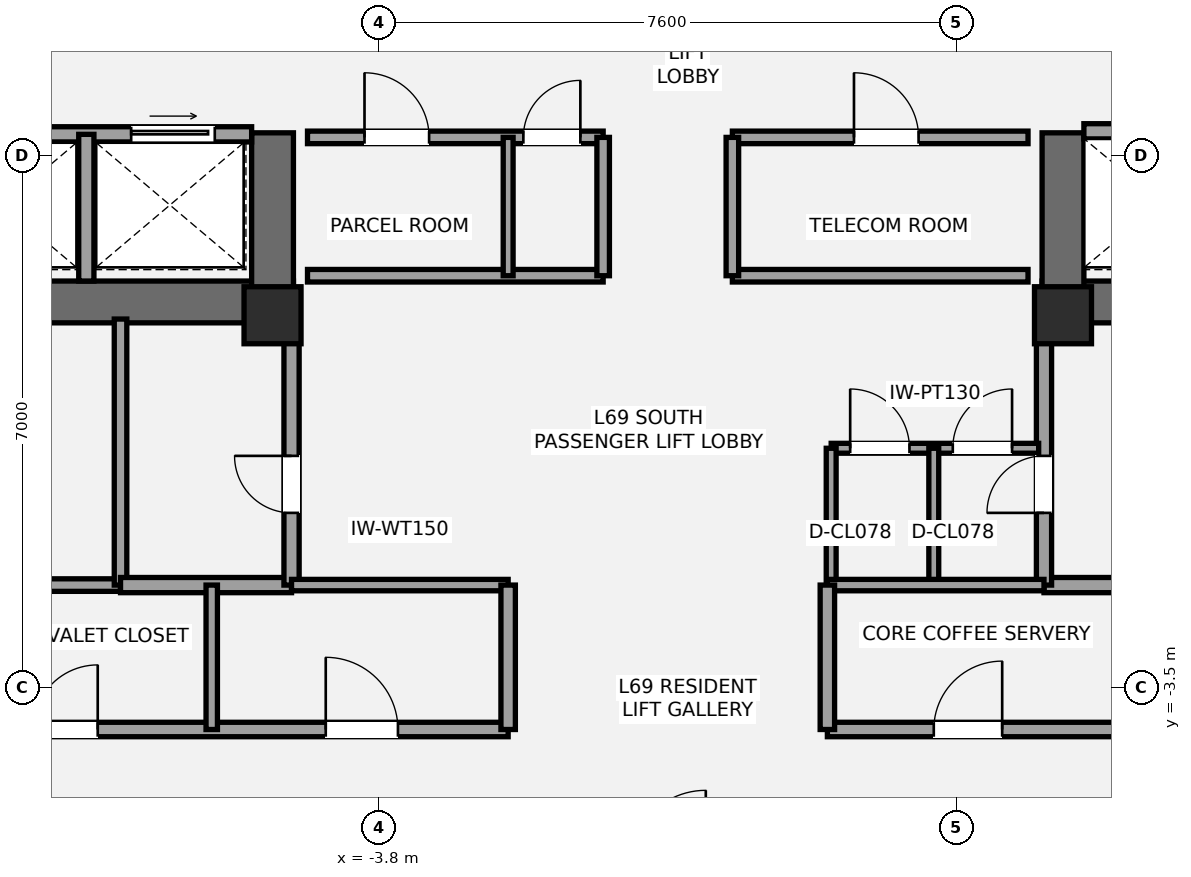
"""IFC4 building model, lengths in metres.
Left out: names, types, materials, properties, quantities, classifications, styles, units other than length and angle.
Written with IfcOpenShell. Run it as: python <this file> out.ifc"""

import sys

from ifc_helpers import new_model, si_unit, direction, frame, frame_2d, origin, origin_2d, place, context, subcontext, project, spatial, rectangle, extrude, element, fill, save


model = new_model("IFC4")
c1 = context("Model", 3, precision=1e-05, world=origin(), true_north=direction((0.0, 1.0)))
c2 = subcontext(c1, "Body", "Model", "MODEL_VIEW")
j1 = project(units=[si_unit("LENGTHUNIT", "METRE"), si_unit("PLANEANGLEUNIT", "RADIAN")], contexts=[c1])
p1 = place(None, origin())
s1 = spatial("IfcSite", under=j1, at=p1, CompositionType="ELEMENT")
p2 = place(p1, origin())
s2 = spatial("IfcBuilding", under=s1, at=p2, CompositionType="ELEMENT")
p3 = place(p2, frame((0.0, 0.0, 244.65)))
s3 = spatial("IfcBuildingStorey", under=s2, at=p3, CompositionType="ELEMENT", Elevation=244.65)
p4 = place(p3, frame((-4.925, 1.575, 0.0), z_axis=(0.0, 0.0, 1.0), x_axis=(-1.0, 0.0, 0.0)))
e1 = element("IfcWall", 1, at=p4, inside=s3, PredefinedType="SHEAR", context=c2, shape_type="SweptSolid", body=[
    extrude(rectangle(XDim=8.775, YDim=0.55, at=frame_2d((4.387, 0.0))), origin(), (0.0, 0.0, 1.0), 3.15),
])
p5 = place(p4, frame((5.375, 0.0, 0.0)))
e2 = element("IfcOpeningElement", 2, at=p5, cuts=e1, PredefinedType="OPENING", context=c2, shape_type="SweptSolid", body=[
    extrude(rectangle(XDim=1.05, YDim=2.15, at=frame_2d((0.525, 1.075))), frame((0.0, 0.285, 0.0), z_axis=(0.0, -1.0, 0.0), x_axis=(1.0, 0.0, 0.0)), (0.0, 0.0, 1.0), 0.57),
])
p6 = place(p4, frame((3.705, 0.0, 0.0)))
e3 = element("IfcOpeningElement", 3, at=p6, cuts=e1, PredefinedType="OPENING", context=c2, shape_type="SweptSolid", body=[
    extrude(rectangle(XDim=1.1, YDim=2.2, at=frame_2d((0.55, 1.1))), frame((0.0, 0.285, 0.0), z_axis=(0.0, -1.0, 0.0), x_axis=(1.0, 0.0, 0.0)), (0.0, 0.0, 1.0), 0.57),
])
p7 = place(p3, frame((-5.2, 1.3, 0.0), z_axis=(0.0, 0.0, 1.0), x_axis=(0.0, 1.0, 0.0)))
e4 = element("IfcWall", 4, at=p7, inside=s3, PredefinedType="SHEAR", context=c2, shape_type="SweptSolid", body=[
    extrude(rectangle(XDim=2.5, YDim=0.55, at=frame_2d((1.25, 0.0))), origin(), (0.0, 0.0, 1.0), 3.15),
])
p8 = place(p3, frame((13.7, 1.575, 0.0), z_axis=(0.0, 0.0, 1.0), x_axis=(-1.0, 0.0, 0.0)))
e5 = element("IfcWall", 5, at=p8, inside=s3, PredefinedType="SHEAR", context=c2, shape_type="SweptSolid", body=[
    extrude(rectangle(XDim=8.775, YDim=0.55, at=frame_2d((4.387, 0.0))), origin(), (0.0, 0.0, 1.0), 3.15),
])
p9 = place(p8, frame((2.35, 0.0, 0.0)))
e6 = element("IfcOpeningElement", 6, at=p9, cuts=e5, PredefinedType="OPENING", context=c2, shape_type="SweptSolid", body=[
    extrude(rectangle(XDim=1.05, YDim=2.15, at=frame_2d((0.525, 1.075))), frame((0.0, 0.285, 0.0), z_axis=(0.0, -1.0, 0.0), x_axis=(1.0, 0.0, 0.0)), (0.0, 0.0, 1.0), 0.57),
])
p10 = place(p8, frame((4.35, 0.0, 0.0)))
e7 = element("IfcOpeningElement", 7, at=p10, cuts=e5, PredefinedType="OPENING", context=c2, shape_type="SweptSolid", body=[
    extrude(rectangle(XDim=1.1, YDim=2.2, at=frame_2d((0.55, 1.1))), frame((0.0, 0.285, 0.0), z_axis=(0.0, -1.0, 0.0), x_axis=(1.0, 0.0, 0.0)), (0.0, 0.0, 1.0), 0.57),
])
p11 = place(p3, frame((5.2, 1.3, 0.0), z_axis=(0.0, 0.0, 1.0), x_axis=(0.0, 1.0, 0.0)))
e8 = element("IfcWall", 8, at=p11, inside=s3, PredefinedType="SHEAR", context=c2, shape_type="SweptSolid", body=[
    extrude(rectangle(XDim=2.5, YDim=0.55, at=frame_2d((1.25, 0.0))), origin(), (0.0, 0.0, 1.0), 3.15),
])
for number, where, z_axis, x_axis in (
    (9, (-5.2, 1.4, 0.0), (0.0, 0.0, 1.0), (1.0, 0.0, 0.0)),
    (10, (5.2, 1.4, 0.0), (0.0, 0.0, 1.0), (1.0, 0.0, 0.0)),
):
    element("IfcColumn", number, at=place(p3, frame(where, z_axis=z_axis, x_axis=x_axis)), inside=s3, PredefinedType="PILASTER", context=c2, shape_type="SweptSolid", body=[
        extrude(rectangle(XDim=0.75, YDim=0.75, at=origin_2d()), origin(), (0.0, 0.0, 1.0), 3.15),
    ])
p12 = place(p3, frame((-13.45, -2.15, 0.0), z_axis=(0.0, 0.0, 1.0), x_axis=(1.0, 0.0, 0.0)))
e11 = element("IfcWall", 11, at=p12, inside=s3, PredefinedType="PARTITIONING", context=c2, shape_type="SweptSolid", body=[
    extrude(rectangle(XDim=6.25, YDim=0.165, at=frame_2d((3.125, 0.0))), origin(), (0.0, 0.0, 1.0), 2.423),
])
p13 = place(p3, frame((-7.2, -2.15, 0.0), z_axis=(0.0, 0.0, 1.0), x_axis=(0.0, 1.0, 0.0)))
e12 = element("IfcWall", 12, at=p13, inside=s3, PredefinedType="PARTITIONING", context=c2, shape_type="SweptSolid", body=[
    extrude(rectangle(XDim=3.5, YDim=0.165, at=frame_2d((1.75, 0.0))), origin(), (0.0, 0.0, 1.0), 2.423),
])
p14 = place(p3, frame((-7.2, -2.15, 0.0), z_axis=(0.0, 0.0, 1.0), x_axis=(1.0, 0.0, 0.0)))
e13 = element("IfcWall", 13, at=p14, inside=s3, PredefinedType="SOLIDWALL", context=c2, shape_type="SweptSolid", body=[
    extrude(rectangle(XDim=2.25, YDim=0.2, at=frame_2d((1.125, 0.0))), origin(), (0.0, 0.0, 1.0), 2.97),
])
p15 = place(p3, frame((-4.95, -2.15, 0.0), z_axis=(0.0, 0.0, 1.0), x_axis=(0.0, 1.0, 0.0)))
e14 = element("IfcWall", 14, at=p15, inside=s3, PredefinedType="SOLIDWALL", context=c2, shape_type="SweptSolid", body=[
    extrude(rectangle(XDim=3.5, YDim=0.2, at=frame_2d((1.75, 0.0))), origin(), (0.0, 0.0, 1.0), 2.423),
])
p16 = place(p15, frame((0.95, 0.0, 0.0)))
e15 = element("IfcOpeningElement", 15, at=p16, cuts=e14, PredefinedType="OPENING", context=c2, shape_type="SweptSolid", body=[
    extrude(rectangle(XDim=0.75, YDim=2.1, at=frame_2d((0.375, 1.05))), frame((0.0, 0.11, 0.0), z_axis=(0.0, -1.0, 0.0), x_axis=(1.0, 0.0, 0.0)), (0.0, 0.0, 1.0), 0.22),
])
p17 = place(p3, frame((4.95, -2.15, 0.0), z_axis=(0.0, 0.0, 1.0), x_axis=(1.0, 0.0, 0.0)))
e16 = element("IfcWall", 16, at=p17, inside=s3, PredefinedType="SOLIDWALL", context=c2, shape_type="SweptSolid", body=[
    extrude(rectangle(XDim=2.25, YDim=0.2, at=frame_2d((1.125, 0.0))), origin(), (0.0, 0.0, 1.0), 2.97),
])
p18 = place(p3, frame((4.95, -2.15, 0.0), z_axis=(0.0, 0.0, 1.0), x_axis=(0.0, 1.0, 0.0)))
e17 = element("IfcWall", 17, at=p18, inside=s3, PredefinedType="SOLIDWALL", context=c2, shape_type="SweptSolid", body=[
    extrude(rectangle(XDim=3.5, YDim=0.2, at=frame_2d((1.75, 0.0))), origin(), (0.0, 0.0, 1.0), 2.423),
])
p19 = place(p18, frame((0.95, 0.0, 0.0)))
e18 = element("IfcOpeningElement", 18, at=p19, cuts=e17, PredefinedType="OPENING", context=c2, shape_type="SweptSolid", body=[
    extrude(rectangle(XDim=0.75, YDim=2.1, at=frame_2d((0.375, 1.05))), frame((0.0, 0.11, 0.0), z_axis=(0.0, -1.0, 0.0), x_axis=(1.0, 0.0, 0.0)), (0.0, 0.0, 1.0), 0.22),
])
p20 = place(p3, frame((2.15, -0.35, 0.0), z_axis=(0.0, 0.0, 1.0), x_axis=(1.0, 0.0, 0.0)))
e19 = element("IfcWall", 19, at=p20, inside=s3, PredefinedType="PARTITIONING", context=c2, shape_type="SweptSolid", body=[
    extrude(rectangle(XDim=2.73, YDim=0.13, at=frame_2d((1.365, 0.0))), origin(), (0.0, 0.0, 1.0), 2.97),
])
p21 = place(p20, frame((0.25, 0.0, 0.0)))
e20 = element("IfcOpeningElement", 20, at=p21, cuts=e19, PredefinedType="OPENING", context=c2, shape_type="SweptSolid", body=[
    extrude(rectangle(XDim=0.78, YDim=2.1, at=frame_2d((0.39, 1.05))), frame((0.0, 0.075, 0.0), z_axis=(0.0, -1.0, 0.0), x_axis=(1.0, 0.0, 0.0)), (0.0, 0.0, 1.0), 0.15),
])
p22 = place(p20, frame((1.6, 0.0, 0.0)))
e21 = element("IfcOpeningElement", 21, at=p22, cuts=e19, PredefinedType="OPENING", context=c2, shape_type="SweptSolid", body=[
    extrude(rectangle(XDim=0.78, YDim=2.1, at=frame_2d((0.39, 1.05))), frame((0.0, 0.075, 0.0), z_axis=(0.0, -1.0, 0.0), x_axis=(1.0, 0.0, 0.0)), (0.0, 0.0, 1.0), 0.15),
])
for number, where, z_axis, x_axis in (
    (22, (2.15, -2.15, 0.0), (0.0, 0.0, 1.0), (0.0, 1.0, 0.0)),
    (23, (3.5, -2.15, 0.0), (0.0, 0.0, 1.0), (0.0, 1.0, 0.0)),
):
    element("IfcWall", number, at=place(p3, frame(where, z_axis=z_axis, x_axis=x_axis)), inside=s3, PredefinedType="PARTITIONING", context=c2, shape_type="SweptSolid", body=[
        extrude(rectangle(XDim=1.8, YDim=0.13, at=frame_2d((0.9, 0.0))), origin(), (0.0, 0.0, 1.0), 2.97),
    ])
p23 = place(p3, frame((-9.78, 3.78, 0.0), z_axis=(0.0, 0.0, 1.0), x_axis=(1.0, 0.0, 0.0)))
e24 = element("IfcWall", 24, at=p23, inside=s3, PredefinedType="SOLIDWALL", context=c2, shape_type="SweptSolid", body=[
    extrude(rectangle(XDim=4.305, YDim=0.2, at=frame_2d((2.152, 0.0))), origin(), (0.0, 0.0, 1.0), 2.97),
])
p24 = place(p23, frame((2.72, 0.0, 0.0)))
e25 = element("IfcOpeningElement", 25, at=p24, cuts=e24, PredefinedType="OPENING", context=c2, shape_type="SweptSolid", body=[
    extrude(rectangle(XDim=1.1, YDim=2.2, at=frame_2d((0.55, 1.1))), frame((0.0, 0.11, 0.0), z_axis=(0.0, -1.0, 0.0), x_axis=(1.0, 0.0, 0.0)), (0.0, 0.0, 1.0), 0.22),
])
p25 = place(p3, frame((-7.65, 1.85, 0.0), z_axis=(0.0, 0.0, 1.0), x_axis=(0.0, 1.0, 0.0)))
e26 = element("IfcWall", 26, at=p25, inside=s3, PredefinedType="SOLIDWALL", context=c2, shape_type="SweptSolid", body=[
    extrude(rectangle(XDim=1.93, YDim=0.2, at=frame_2d((0.965, 0.0))), origin(), (0.0, 0.0, 1.0), 2.97),
])
p26 = place(p3, frame((5.475, 3.82, 0.0), z_axis=(0.0, 0.0, 1.0), x_axis=(1.0, 0.0, 0.0)))
e27 = element("IfcWall", 27, at=p26, inside=s3, PredefinedType="SOLIDWALL", context=c2, shape_type="SweptSolid", body=[
    extrude(rectangle(XDim=4.305, YDim=0.2, at=frame_2d((2.152, 0.0))), origin(), (0.0, 0.0, 1.0), 2.97),
])
p27 = place(p26, frame((0.65, 0.0, 0.0)))
e28 = element("IfcOpeningElement", 28, at=p27, cuts=e27, PredefinedType="OPENING", context=c2, shape_type="SweptSolid", body=[
    extrude(rectangle(XDim=1.2, YDim=2.2, at=frame_2d((0.6, 1.1))), frame((0.0, 0.11, 0.0), z_axis=(0.0, -1.0, 0.0), x_axis=(1.0, 0.0, 0.0)), (0.0, 0.0, 1.0), 0.22),
])
p28 = place(p3, frame((-4.74, 1.92, 0.0), z_axis=(0.0, 0.0, 1.0), x_axis=(1.0, 0.0, 0.0)))
e29 = element("IfcWall", 29, at=p28, inside=s3, PredefinedType="PARTITIONING", context=c2, shape_type="SweptSolid", body=[
    extrude(rectangle(XDim=3.89, YDim=0.165, at=frame_2d((1.945, 0.0))), origin(), (0.0, 0.0, 1.0), 2.11),
])
p29 = place(p3, frame((-4.74, 3.74, 0.0), z_axis=(0.0, 0.0, 1.0), x_axis=(1.0, 0.0, 0.0)))
e30 = element("IfcWall", 30, at=p29, inside=s3, PredefinedType="PARTITIONING", context=c2, shape_type="SweptSolid", body=[
    extrude(rectangle(XDim=3.89, YDim=0.165, at=frame_2d((1.945, 0.0))), origin(), (0.0, 0.0, 1.0), 2.97),
])
p30 = place(p29, frame((0.75, 0.0, 0.0)))
e31 = element("IfcOpeningElement", 31, at=p30, cuts=e30, PredefinedType="OPENING", context=c2, shape_type="SweptSolid", body=[
    extrude(rectangle(XDim=0.85, YDim=2.1, at=frame_2d((0.425, 1.05))), frame((0.0, 0.093, 0.0), z_axis=(0.0, -1.0, 0.0), x_axis=(1.0, 0.0, 0.0)), (0.0, 0.0, 1.0), 0.185),
])
p31 = place(p29, frame((2.84, 0.0, 0.0)))
e32 = element("IfcOpeningElement", 32, at=p31, cuts=e30, PredefinedType="OPENING", context=c2, shape_type="SweptSolid", body=[
    extrude(rectangle(XDim=0.75, YDim=2.1, at=frame_2d((0.375, 1.05))), frame((0.0, 0.093, 0.0), z_axis=(0.0, -1.0, 0.0), x_axis=(1.0, 0.0, 0.0)), (0.0, 0.0, 1.0), 0.185),
])
p32 = place(p3, frame((-0.85, 1.92, 0.0), z_axis=(0.0, 0.0, 1.0), x_axis=(0.0, 1.0, 0.0)))
e33 = element("IfcWall", 33, at=p32, inside=s3, PredefinedType="PARTITIONING", context=c2, shape_type="SweptSolid", body=[
    extrude(rectangle(XDim=1.82, YDim=0.165, at=frame_2d((0.91, 0.0))), origin(), (0.0, 0.0, 1.0), 2.97),
])
p33 = place(p3, frame((0.85, 1.92, 0.0), z_axis=(0.0, 0.0, 1.0), x_axis=(1.0, 0.0, 0.0)))
e34 = element("IfcWall", 34, at=p33, inside=s3, PredefinedType="PARTITIONING", context=c2, shape_type="SweptSolid", body=[
    extrude(rectangle(XDim=3.89, YDim=0.165, at=frame_2d((1.945, 0.0))), origin(), (0.0, 0.0, 1.0), 2.11),
])
p34 = place(p3, frame((0.85, 3.74, 0.0), z_axis=(0.0, 0.0, 1.0), x_axis=(1.0, 0.0, 0.0)))
e35 = element("IfcWall", 35, at=p34, inside=s3, PredefinedType="PARTITIONING", context=c2, shape_type="SweptSolid", body=[
    extrude(rectangle(XDim=3.89, YDim=0.165, at=frame_2d((1.945, 0.0))), origin(), (0.0, 0.0, 1.0), 2.97),
])
p35 = place(p34, frame((1.6, 0.0, 0.0)))
e36 = element("IfcOpeningElement", 36, at=p35, cuts=e35, PredefinedType="OPENING", context=c2, shape_type="SweptSolid", body=[
    extrude(rectangle(XDim=0.85, YDim=2.1, at=frame_2d((0.425, 1.05))), frame((0.0, 0.093, 0.0), z_axis=(0.0, -1.0, 0.0), x_axis=(1.0, 0.0, 0.0)), (0.0, 0.0, 1.0), 0.185),
])
p36 = place(p3, frame((0.85, 1.92, 0.0), z_axis=(0.0, 0.0, 1.0), x_axis=(0.0, 1.0, 0.0)))
e37 = element("IfcWall", 37, at=p36, inside=s3, PredefinedType="PARTITIONING", context=c2, shape_type="SweptSolid", body=[
    extrude(rectangle(XDim=1.82, YDim=0.165, at=frame_2d((0.91, 0.0))), origin(), (0.0, 0.0, 1.0), 2.97),
])
p37 = place(p3, frame((-2.1, 1.92, 0.0), z_axis=(0.0, 0.0, 1.0), x_axis=(0.0, 1.0, 0.0)))
e38 = element("IfcWall", 38, at=p37, inside=s3, PredefinedType="PARTITIONING", context=c2, shape_type="SweptSolid", body=[
    extrude(rectangle(XDim=1.82, YDim=0.13, at=frame_2d((0.91, 0.0))), origin(), (0.0, 0.0, 1.0), 2.97),
])
p38 = place(p3, frame((-13.45, -4.05, 0.0), z_axis=(0.0, 0.0, 1.0), x_axis=(1.0, 0.0, 0.0)))
e39 = element("IfcWall", 39, at=p38, inside=s3, PredefinedType="PLUMBINGWALL", context=c2, shape_type="SweptSolid", body=[
    extrude(rectangle(XDim=11.35, YDim=0.19, at=frame_2d((5.675, 0.0))), origin(), (0.0, 0.0, 1.0), 2.357),
])
p39 = place(p38, frame((1.25, 0.0, 0.0)))
e40 = element("IfcOpeningElement", 40, at=p39, cuts=e39, PredefinedType="OPENING", context=c2, shape_type="SweptSolid", body=[
    extrude(rectangle(XDim=0.85, YDim=2.1, at=frame_2d((0.425, 1.05))), frame((0.0, 0.105, 0.0), z_axis=(0.0, -1.0, 0.0), x_axis=(1.0, 0.0, 0.0)), (0.0, 0.0, 1.0), 0.21),
])
p40 = place(p38, frame((5.1, 0.0, 0.0)))
e41 = element("IfcOpeningElement", 41, at=p40, cuts=e39, PredefinedType="OPENING", context=c2, shape_type="SweptSolid", body=[
    extrude(rectangle(XDim=0.85, YDim=2.1, at=frame_2d((0.425, 1.05))), frame((0.0, 0.105, 0.0), z_axis=(0.0, -1.0, 0.0), x_axis=(1.0, 0.0, 0.0)), (0.0, 0.0, 1.0), 0.21),
])
p41 = place(p38, frame((8.95, 0.0, 0.0)))
e42 = element("IfcOpeningElement", 42, at=p41, cuts=e39, PredefinedType="OPENING", context=c2, shape_type="SweptSolid", body=[
    extrude(rectangle(XDim=0.95, YDim=2.15, at=frame_2d((0.475, 1.075))), frame((0.0, 0.105, 0.0), z_axis=(0.0, -1.0, 0.0), x_axis=(1.0, 0.0, 0.0)), (0.0, 0.0, 1.0), 0.21),
])
p42 = place(p3, frame((-4.95, -2.15, 0.0), z_axis=(0.0, 0.0, 1.0), x_axis=(1.0, 0.0, 0.0)))
e43 = element("IfcWall", 43, at=p42, inside=s3, PredefinedType="PLUMBINGWALL", context=c2, shape_type="SweptSolid", body=[
    extrude(rectangle(XDim=2.85, YDim=0.15, at=frame_2d((1.425, 0.0))), origin(), (0.0, 0.0, 1.0), 2.97),
])
p43 = place(p3, frame((-2.1, -4.05, 0.0), z_axis=(0.0, 0.0, 1.0), x_axis=(0.0, 1.0, 0.0)))
e44 = element("IfcWall", 44, at=p43, inside=s3, PredefinedType="PLUMBINGWALL", context=c2, shape_type="SweptSolid", body=[
    extrude(rectangle(XDim=1.9, YDim=0.19, at=frame_2d((0.95, 0.0))), origin(), (0.0, 0.0, 1.0), 2.423),
])
p44 = place(p3, frame((-6.0, -4.05, 0.0), z_axis=(0.0, 0.0, 1.0), x_axis=(0.0, 1.0, 0.0)))
e45 = element("IfcWall", 45, at=p44, inside=s3, PredefinedType="PLUMBINGWALL", context=c2, shape_type="SweptSolid", body=[
    extrude(rectangle(XDim=1.9, YDim=0.15, at=frame_2d((0.95, 0.0))), origin(), (0.0, 0.0, 1.0), 2.431),
])
p45 = place(p3, frame((2.1, -4.05, 0.0), z_axis=(0.0, 0.0, 1.0), x_axis=(1.0, 0.0, 0.0)))
e46 = element("IfcWall", 46, at=p45, inside=s3, PredefinedType="PLUMBINGWALL", context=c2, shape_type="SweptSolid", body=[
    extrude(rectangle(XDim=11.35, YDim=0.19, at=frame_2d((5.675, 0.0))), origin(), (0.0, 0.0, 1.0), 2.357),
])
p46 = place(p45, frame((1.4, 0.0, 0.0)))
e47 = element("IfcOpeningElement", 47, at=p46, cuts=e46, PredefinedType="OPENING", context=c2, shape_type="SweptSolid", body=[
    extrude(rectangle(XDim=0.9, YDim=2.1, at=frame_2d((0.45, 1.05))), frame((0.0, 0.105, 0.0), z_axis=(0.0, -1.0, 0.0), x_axis=(1.0, 0.0, 0.0)), (0.0, 0.0, 1.0), 0.21),
])
p47 = place(p45, frame((5.3, 0.0, 0.0)))
e48 = element("IfcOpeningElement", 48, at=p47, cuts=e46, PredefinedType="OPENING", context=c2, shape_type="SweptSolid", body=[
    extrude(rectangle(XDim=0.9, YDim=2.1, at=frame_2d((0.45, 1.05))), frame((0.0, 0.105, 0.0), z_axis=(0.0, -1.0, 0.0), x_axis=(1.0, 0.0, 0.0)), (0.0, 0.0, 1.0), 0.21),
])
p48 = place(p45, frame((9.1, 0.0, 0.0)))
e49 = element("IfcOpeningElement", 49, at=p48, cuts=e46, PredefinedType="OPENING", context=c2, shape_type="SweptSolid", body=[
    extrude(rectangle(XDim=0.9, YDim=2.1, at=frame_2d((0.45, 1.05))), frame((0.0, 0.105, 0.0), z_axis=(0.0, -1.0, 0.0), x_axis=(1.0, 0.0, 0.0)), (0.0, 0.0, 1.0), 0.21),
])
p49 = place(p3, frame((2.1, -2.15, 0.0), z_axis=(0.0, 0.0, 1.0), x_axis=(1.0, 0.0, 0.0)))
e50 = element("IfcWall", 50, at=p49, inside=s3, PredefinedType="PLUMBINGWALL", context=c2, shape_type="SweptSolid", body=[
    extrude(rectangle(XDim=2.85, YDim=0.15, at=frame_2d((1.425, 0.0))), origin(), (0.0, 0.0, 1.0), 2.423),
])
p50 = place(p3, frame((2.1, -4.05, 0.0), z_axis=(0.0, 0.0, 1.0), x_axis=(0.0, 1.0, 0.0)))
e51 = element("IfcWall", 51, at=p50, inside=s3, PredefinedType="PLUMBINGWALL", context=c2, shape_type="SweptSolid", body=[
    extrude(rectangle(XDim=1.9, YDim=0.19, at=frame_2d((0.95, 0.0))), origin(), (0.0, 0.0, 1.0), 2.97),
])
p51 = place(p16, origin())
e52 = element("IfcDoor", 52, at=p51, inside=s3, OperationType="SINGLE_SWING_RIGHT", PredefinedType="DOOR", context=c2, shape_type="SweptSolid", body=[
    extrude(rectangle(XDim=0.75, YDim=2.1, at=frame_2d((0.375, 1.05))), frame((0.0, 0.025, 0.0), z_axis=(0.0, -1.0, 0.0), x_axis=(1.0, 0.0, 0.0)), (0.0, 0.0, 1.0), 0.05),
])
fill(e15, e52)
p52 = place(p19, origin())
e53 = element("IfcDoor", 53, at=p52, inside=s3, OperationType="SINGLE_SWING_LEFT", PredefinedType="DOOR", context=c2, shape_type="SweptSolid", body=[
    extrude(rectangle(XDim=0.75, YDim=2.1, at=frame_2d((0.375, 1.05))), frame((0.0, 0.025, 0.0), z_axis=(0.0, -1.0, 0.0), x_axis=(1.0, 0.0, 0.0)), (0.0, 0.0, 1.0), 0.05),
])
fill(e18, e53)
p53 = place(p21, origin())
e54 = element("IfcDoor", 54, at=p53, inside=s3, OperationType="SINGLE_SWING_LEFT", PredefinedType="DOOR", context=c2, shape_type="SweptSolid", body=[
    extrude(rectangle(XDim=0.78, YDim=2.1, at=frame_2d((0.39, 1.05))), frame((0.0, 0.025, 0.0), z_axis=(0.0, -1.0, 0.0), x_axis=(1.0, 0.0, 0.0)), (0.0, 0.0, 1.0), 0.05),
])
fill(e20, e54)
p54 = place(p22, origin())
e55 = element("IfcDoor", 55, at=p54, inside=s3, OperationType="SINGLE_SWING_RIGHT", PredefinedType="DOOR", context=c2, shape_type="SweptSolid", body=[
    extrude(rectangle(XDim=0.78, YDim=2.1, at=frame_2d((0.39, 1.05))), frame((0.0, 0.025, 0.0), z_axis=(0.0, -1.0, 0.0), x_axis=(1.0, 0.0, 0.0)), (0.0, 0.0, 1.0), 0.05),
])
fill(e21, e55)
p55 = place(p24, origin())
e56 = element("IfcDoor", 56, at=p55, inside=s3, OperationType="SLIDING_TO_LEFT", PredefinedType="DOOR", context=c2, shape_type="SweptSolid", body=[
    extrude(rectangle(XDim=1.1, YDim=2.2, at=frame_2d((0.55, 1.1))), frame((0.0, 0.025, 0.0), z_axis=(0.0, -1.0, 0.0), x_axis=(1.0, 0.0, 0.0)), (0.0, 0.0, 1.0), 0.05),
])
fill(e25, e56)
p56 = place(p30, origin())
e57 = element("IfcDoor", 57, at=p56, inside=s3, OperationType="SINGLE_SWING_LEFT", PredefinedType="DOOR", context=c2, shape_type="SweptSolid", body=[
    extrude(rectangle(XDim=0.85, YDim=2.1, at=frame_2d((0.425, 1.05))), frame((0.0, 0.025, 0.0), z_axis=(0.0, -1.0, 0.0), x_axis=(1.0, 0.0, 0.0)), (0.0, 0.0, 1.0), 0.05),
])
fill(e31, e57)
p57 = place(p31, origin())
e58 = element("IfcDoor", 58, at=p57, inside=s3, OperationType="SINGLE_SWING_RIGHT", PredefinedType="DOOR", context=c2, shape_type="SweptSolid", body=[
    extrude(rectangle(XDim=0.75, YDim=2.1, at=frame_2d((0.375, 1.05))), frame((0.0, 0.025, 0.0), z_axis=(0.0, -1.0, 0.0), x_axis=(1.0, 0.0, 0.0)), (0.0, 0.0, 1.0), 0.05),
])
fill(e32, e58)
p58 = place(p35, origin())
e59 = element("IfcDoor", 59, at=p58, inside=s3, OperationType="SINGLE_SWING_LEFT", PredefinedType="DOOR", context=c2, shape_type="SweptSolid", body=[
    extrude(rectangle(XDim=0.85, YDim=2.1, at=frame_2d((0.425, 1.05))), frame((0.0, 0.025, 0.0), z_axis=(0.0, -1.0, 0.0), x_axis=(1.0, 0.0, 0.0)), (0.0, 0.0, 1.0), 0.05),
])
fill(e36, e59)
p59 = place(p40, origin())
e60 = element("IfcDoor", 60, at=p59, inside=s3, OperationType="SINGLE_SWING_RIGHT", PredefinedType="DOOR", context=c2, shape_type="SweptSolid", body=[
    extrude(rectangle(XDim=0.85, YDim=2.1, at=frame_2d((0.425, 1.05))), frame((0.0, 0.025, 0.0), z_axis=(0.0, -1.0, 0.0), x_axis=(1.0, 0.0, 0.0)), (0.0, 0.0, 1.0), 0.05),
])
fill(e41, e60)
p60 = place(p41, origin())
e61 = element("IfcDoor", 61, at=p60, inside=s3, OperationType="SINGLE_SWING_LEFT", PredefinedType="DOOR", context=c2, shape_type="SweptSolid", body=[
    extrude(rectangle(XDim=0.95, YDim=2.15, at=frame_2d((0.475, 1.075))), frame((0.0, 0.025, 0.0), z_axis=(0.0, -1.0, 0.0), x_axis=(1.0, 0.0, 0.0)), (0.0, 0.0, 1.0), 0.05),
])
fill(e42, e61)
p61 = place(p46, origin())
e62 = element("IfcDoor", 62, at=p61, inside=s3, OperationType="SINGLE_SWING_RIGHT", PredefinedType="DOOR", context=c2, shape_type="SweptSolid", body=[
    extrude(rectangle(XDim=0.9, YDim=2.1, at=frame_2d((0.45, 1.05))), frame((0.0, 0.025, 0.0), z_axis=(0.0, -1.0, 0.0), x_axis=(1.0, 0.0, 0.0)), (0.0, 0.0, 1.0), 0.05),
])
fill(e47, e62)
save(model, sys.argv[1])
